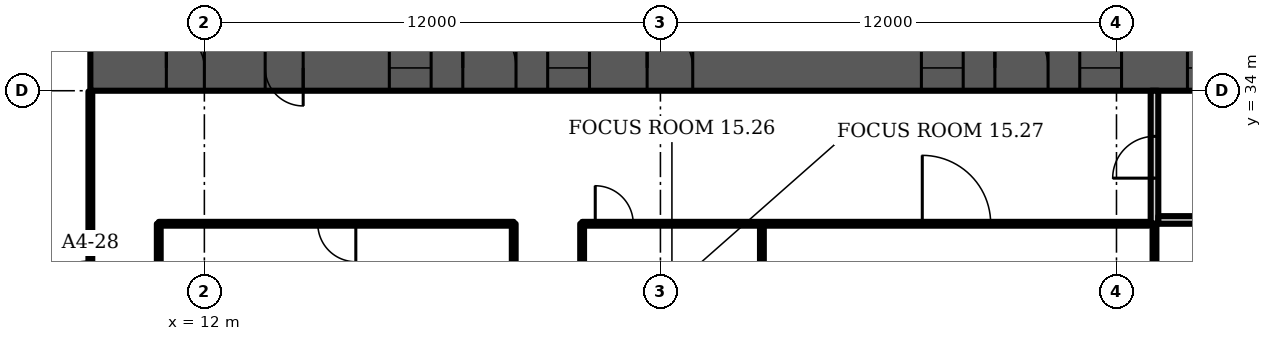
"""IFC4 building model, lengths in metres.
Left out: names, types, materials, properties, quantities, classifications, styles, units other than length and angle.
Written with IfcOpenShell. Run it as: python <this file> out.ifc"""

import sys

from ifc_helpers import new_model, si_unit, direction, frame, frame_2d, origin, place, context, subcontext, project, spatial, rectangle, extrude, element, fill, save


model = new_model("IFC4")
c1 = context("Model", 3, precision=1e-05, world=origin(), true_north=direction((0.0, 1.0)))
c2 = subcontext(c1, "Body", "Model", "MODEL_VIEW")
j1 = project(units=[si_unit("LENGTHUNIT", "METRE"), si_unit("PLANEANGLEUNIT", "RADIAN")], contexts=[c1])
p1 = place(None, origin())
s1 = spatial("IfcSite", under=j1, at=p1, CompositionType="ELEMENT")
p2 = place(p1, origin())
s2 = spatial("IfcBuilding", under=s1, at=p2, CompositionType="ELEMENT")
p3 = place(p2, frame((0.0, 0.0, 73.9)))
s3 = spatial("IfcBuildingStorey", under=s2, at=p3, CompositionType="ELEMENT", Elevation=73.9)
p4 = place(p3, frame((9.0, 34.6, 0.0), z_axis=(0.0, 0.0, 1.0), x_axis=(1.0, 0.0, 0.0)))
e1 = element("IfcWall", 1, at=p4, inside=s3, PredefinedType="SHEAR", context=c2, shape_type="SweptSolid", body=[
    extrude(rectangle(XDim=56.0, YDim=1.2, at=frame_2d((28.0, 0.0))), origin(), (0.0, 0.0, 1.0), 3.6),
])
p5 = place(p4, frame((2.0, 0.0, 0.0)))
e2 = element("IfcOpeningElement", 2, at=p5, cuts=e1, PredefinedType="OPENING", context=c2, shape_type="SweptSolid", body=[
    extrude(rectangle(XDim=1.0, YDim=2.1, at=frame_2d((0.5, 1.05))), frame((0.0, 0.61, 0.0), z_axis=(0.0, -1.0, 0.0), x_axis=(1.0, 0.0, 0.0)), (0.0, 0.0, 1.0), 1.22),
])
p6 = place(p4, frame((4.6, 0.0, 0.0)))
e3 = element("IfcOpeningElement", 3, at=p6, cuts=e1, PredefinedType="OPENING", context=c2, shape_type="SweptSolid", body=[
    extrude(rectangle(XDim=1.0, YDim=2.1, at=frame_2d((0.5, 1.05))), frame((0.0, 0.61, 0.0), z_axis=(0.0, -1.0, 0.0), x_axis=(1.0, 0.0, 0.0)), (0.0, 0.0, 1.0), 1.22),
])
p7 = place(p4, frame((7.867, 0.0, 0.0)))
e4 = element("IfcOpeningElement", 4, at=p7, cuts=e1, PredefinedType="OPENING", context=c2, shape_type="SweptSolid", body=[
    extrude(rectangle(XDim=1.1, YDim=2.1, at=frame_2d((0.55, 1.05))), frame((0.0, 0.61, 0.0), z_axis=(0.0, -1.0, 0.0), x_axis=(1.0, 0.0, 0.0)), (0.0, 0.0, 1.0), 1.22),
])
p8 = place(p4, frame((12.033, 0.0, 0.0)))
e5 = element("IfcOpeningElement", 5, at=p8, cuts=e1, PredefinedType="OPENING", context=c2, shape_type="SweptSolid", body=[
    extrude(rectangle(XDim=1.1, YDim=2.1, at=frame_2d((0.55, 1.05))), frame((0.0, 0.61, 0.0), z_axis=(0.0, -1.0, 0.0), x_axis=(1.0, 0.0, 0.0)), (0.0, 0.0, 1.0), 1.22),
])
p9 = place(p4, frame((9.8, 0.0, 0.0)))
e6 = element("IfcOpeningElement", 6, at=p9, cuts=e1, PredefinedType="OPENING", context=c2, shape_type="SweptSolid", body=[
    extrude(rectangle(XDim=1.4, YDim=2.1, at=frame_2d((0.7, 1.05))), frame((0.0, 0.61, 0.0), z_axis=(0.0, -1.0, 0.0), x_axis=(1.0, 0.0, 0.0)), (0.0, 0.0, 1.0), 1.22),
])
p10 = place(p4, frame((14.65, 0.0, 0.0)))
e7 = element("IfcOpeningElement", 7, at=p10, cuts=e1, PredefinedType="OPENING", context=c2, shape_type="SweptSolid", body=[
    extrude(rectangle(XDim=1.2, YDim=2.1, at=frame_2d((0.6, 1.05))), frame((0.0, 0.61, 0.0), z_axis=(0.0, -1.0, 0.0), x_axis=(1.0, 0.0, 0.0)), (0.0, 0.0, 1.0), 1.22),
])
p11 = place(p4, frame((21.867, 0.0, 0.0)))
e8 = element("IfcOpeningElement", 8, at=p11, cuts=e1, PredefinedType="OPENING", context=c2, shape_type="SweptSolid", body=[
    extrude(rectangle(XDim=1.1, YDim=2.1, at=frame_2d((0.55, 1.05))), frame((0.0, 0.61, 0.0), z_axis=(0.0, -1.0, 0.0), x_axis=(1.0, 0.0, 0.0)), (0.0, 0.0, 1.0), 1.22),
])
p12 = place(p4, frame((26.033, 0.0, 0.0)))
e9 = element("IfcOpeningElement", 9, at=p12, cuts=e1, PredefinedType="OPENING", context=c2, shape_type="SweptSolid", body=[
    extrude(rectangle(XDim=1.1, YDim=2.1, at=frame_2d((0.55, 1.05))), frame((0.0, 0.61, 0.0), z_axis=(0.0, -1.0, 0.0), x_axis=(1.0, 0.0, 0.0)), (0.0, 0.0, 1.0), 1.22),
])
p13 = place(p4, frame((23.8, 0.0, 0.0)))
e10 = element("IfcOpeningElement", 10, at=p13, cuts=e1, PredefinedType="OPENING", context=c2, shape_type="SweptSolid", body=[
    extrude(rectangle(XDim=1.4, YDim=2.1, at=frame_2d((0.7, 1.05))), frame((0.0, 0.61, 0.0), z_axis=(0.0, -1.0, 0.0), x_axis=(1.0, 0.0, 0.0)), (0.0, 0.0, 1.0), 1.22),
])
p14 = place(p4, frame((28.867, 0.0, 0.0)))
e11 = element("IfcOpeningElement", 11, at=p14, cuts=e1, PredefinedType="OPENING", context=c2, shape_type="SweptSolid", body=[
    extrude(rectangle(XDim=1.1, YDim=2.1, at=frame_2d((0.55, 1.05))), frame((0.0, 0.61, 0.0), z_axis=(0.0, -1.0, 0.0), x_axis=(1.0, 0.0, 0.0)), (0.0, 0.0, 1.0), 1.22),
])
p15 = place(p4, frame((33.033, 0.0, 0.0)))
e12 = element("IfcOpeningElement", 12, at=p15, cuts=e1, PredefinedType="OPENING", context=c2, shape_type="SweptSolid", body=[
    extrude(rectangle(XDim=1.1, YDim=2.1, at=frame_2d((0.55, 1.05))), frame((0.0, 0.61, 0.0), z_axis=(0.0, -1.0, 0.0), x_axis=(1.0, 0.0, 0.0)), (0.0, 0.0, 1.0), 1.22),
])
p16 = place(p4, frame((40.15, 0.0, 0.0)))
e13 = element("IfcOpeningElement", 13, at=p16, cuts=e1, PredefinedType="OPENING", context=c2, shape_type="SweptSolid", body=[
    extrude(rectangle(XDim=1.2, YDim=2.1, at=frame_2d((0.6, 1.05))), frame((0.0, 0.61, 0.0), z_axis=(0.0, -1.0, 0.0), x_axis=(1.0, 0.0, 0.0)), (0.0, 0.0, 1.0), 1.22),
])
p17 = place(p4, frame((44.8, 0.0, 0.0)))
e14 = element("IfcOpeningElement", 14, at=p17, cuts=e1, PredefinedType="OPENING", context=c2, shape_type="SweptSolid", body=[
    extrude(rectangle(XDim=1.4, YDim=2.1, at=frame_2d((0.7, 1.05))), frame((0.0, 0.61, 0.0), z_axis=(0.0, -1.0, 0.0), x_axis=(1.0, 0.0, 0.0)), (0.0, 0.0, 1.0), 1.22),
])
p18 = place(p4, frame((49.867, 0.0, 0.0)))
e15 = element("IfcOpeningElement", 15, at=p18, cuts=e1, PredefinedType="OPENING", context=c2, shape_type="SweptSolid", body=[
    extrude(rectangle(XDim=1.1, YDim=2.1, at=frame_2d((0.55, 1.05))), frame((0.0, 0.61, 0.0), z_axis=(0.0, -1.0, 0.0), x_axis=(1.0, 0.0, 0.0)), (0.0, 0.0, 1.0), 1.22),
])
p19 = place(p4, frame((53.5, 0.0, 0.0)))
e16 = element("IfcOpeningElement", 16, at=p19, cuts=e1, PredefinedType="OPENING", context=c2, shape_type="SweptSolid", body=[
    extrude(rectangle(XDim=1.1, YDim=2.1, at=frame_2d((0.55, 1.05))), frame((0.0, 0.61, 0.0), z_axis=(0.0, -1.0, 0.0), x_axis=(1.0, 0.0, 0.0)), (0.0, 0.0, 1.0), 1.22),
])
p20 = place(p4, frame((51.567, 0.0, 0.0)))
e17 = element("IfcOpeningElement", 17, at=p20, cuts=e1, PredefinedType="OPENING", context=c2, shape_type="SweptSolid", body=[
    extrude(rectangle(XDim=1.4, YDim=2.1, at=frame_2d((0.7, 1.05))), frame((0.0, 0.61, 0.0), z_axis=(0.0, -1.0, 0.0), x_axis=(1.0, 0.0, 0.0)), (0.0, 0.0, 1.0), 1.22),
])
p21 = place(p3, frame((37.0, 30.5, 0.0), z_axis=(0.0, 0.0, 1.0), x_axis=(0.0, 1.0, 0.0)))
e18 = element("IfcWall", 18, at=p21, inside=s3, PredefinedType="PARTITIONING", context=c2, shape_type="SweptSolid", body=[
    extrude(rectangle(XDim=3.5, YDim=0.2, at=frame_2d((1.75, 0.0))), origin(), (0.0, 0.0, 1.0), 3.2),
])
p22 = place(p21, frame((1.2, 0.0, 0.0)))
e19 = element("IfcOpeningElement", 19, at=p22, cuts=e18, PredefinedType="OPENING", context=c2, shape_type="SweptSolid", body=[
    extrude(rectangle(XDim=1.1, YDim=2.1, at=frame_2d((0.55, 1.05))), frame((0.0, 0.11, 0.0), z_axis=(0.0, -1.0, 0.0), x_axis=(1.0, 0.0, 0.0)), (0.0, 0.0, 1.0), 0.22),
])
p23 = place(p3, frame((37.1, 30.6, 0.0), z_axis=(0.0, 0.0, 1.0), x_axis=(1.0, 0.0, 0.0)))
e20 = element("IfcWall", 20, at=p23, inside=s3, PredefinedType="PARTITIONING", context=c2, shape_type="SweptSolid", body=[
    extrude(rectangle(XDim=2.8, YDim=0.2, at=frame_2d((1.4, 0.0))), origin(), (0.0, 0.0, 1.0), 3.2),
])
p24 = place(p3, frame((9.0, 26.02, 0.0), z_axis=(0.0, 0.0, 1.0), x_axis=(0.0, 1.0, 0.0)))
e21 = element("IfcWall", 21, at=p24, inside=s3, PredefinedType="PARTITIONING", context=c2, shape_type="SweptSolid", body=[
    extrude(rectangle(XDim=7.96, YDim=0.1, at=frame_2d((3.98, 0.0))), origin(), (0.0, 0.0, 1.0), 3.2),
])
p25 = place(p24, frame((1.7, 0.0, 0.0)))
e22 = element("IfcOpeningElement", 22, at=p25, cuts=e21, PredefinedType="OPENING", context=c2, shape_type="SweptSolid", body=[
    extrude(rectangle(XDim=1.8, YDim=2.1, at=frame_2d((0.9, 1.05))), frame((0.0, 0.06, 0.0), z_axis=(0.0, -1.0, 0.0), x_axis=(1.0, 0.0, 0.0)), (0.0, 0.0, 1.0), 0.12),
])
p26 = place(p3, frame((10.8, 21.6, 0.0), z_axis=(0.0, 0.0, 1.0), x_axis=(0.0, 1.0, 0.0)))
e23 = element("IfcWall", 23, at=p26, inside=s3, PredefinedType="PARTITIONING", context=c2, shape_type="SweptSolid", body=[
    extrude(rectangle(XDim=8.9, YDim=0.1, at=frame_2d((4.45, 0.0))), origin(), (0.0, 0.0, 1.0), 3.2),
])
p27 = place(p3, frame((10.8, 30.5, 0.0), z_axis=(0.0, 0.0, 1.0), x_axis=(1.0, 0.0, 0.0)))
e24 = element("IfcWall", 24, at=p27, inside=s3, PredefinedType="PARTITIONING", context=c2, shape_type="SweptSolid", body=[
    extrude(rectangle(XDim=9.34, YDim=0.1, at=frame_2d((4.67, 0.0))), origin(), (0.0, 0.0, 1.0), 3.2),
])
p28 = place(p27, frame((4.185, 0.0, 0.0)))
e25 = element("IfcOpeningElement", 25, at=p28, cuts=e24, PredefinedType="OPENING", context=c2, shape_type="SweptSolid", body=[
    extrude(rectangle(XDim=1.0, YDim=2.1, at=frame_2d((0.5, 1.05))), frame((0.0, 0.06, 0.0), z_axis=(0.0, -1.0, 0.0), x_axis=(1.0, 0.0, 0.0)), (0.0, 0.0, 1.0), 0.12),
])
p29 = place(p3, frame((20.14, -1.13, 0.0), z_axis=(0.0, 0.0, 1.0), x_axis=(0.0, 1.0, 0.0)))
e26 = element("IfcWall", 26, at=p29, inside=s3, PredefinedType="PARTITIONING", context=c2, shape_type="SweptSolid", body=[
    extrude(rectangle(XDim=31.63, YDim=0.1, at=frame_2d((15.815, 0.0))), origin(), (0.0, 0.0, 1.0), 3.2),
])
p30 = place(p29, frame((1.825, 0.0, 0.0)))
e27 = element("IfcOpeningElement", 27, at=p30, cuts=e26, PredefinedType="OPENING", context=c2, shape_type="SweptSolid", body=[
    extrude(rectangle(XDim=1.0, YDim=2.1, at=frame_2d((0.5, 1.05))), frame((0.0, 0.06, 0.0), z_axis=(0.0, -1.0, 0.0), x_axis=(1.0, 0.0, 0.0)), (0.0, 0.0, 1.0), 0.12),
])
p31 = place(p29, frame((6.305, 0.0, 0.0)))
e28 = element("IfcOpeningElement", 28, at=p31, cuts=e26, PredefinedType="OPENING", context=c2, shape_type="SweptSolid", body=[
    extrude(rectangle(XDim=1.0, YDim=2.1, at=frame_2d((0.5, 1.05))), frame((0.0, 0.06, 0.0), z_axis=(0.0, -1.0, 0.0), x_axis=(1.0, 0.0, 0.0)), (0.0, 0.0, 1.0), 0.12),
])
p32 = place(p29, frame((11.35, 0.0, 0.0)))
e29 = element("IfcOpeningElement", 29, at=p32, cuts=e26, PredefinedType="OPENING", context=c2, shape_type="SweptSolid", body=[
    extrude(rectangle(XDim=1.0, YDim=2.1, at=frame_2d((0.5, 1.05))), frame((0.0, 0.06, 0.0), z_axis=(0.0, -1.0, 0.0), x_axis=(1.0, 0.0, 0.0)), (0.0, 0.0, 1.0), 0.12),
])
p33 = place(p29, frame((15.985, 0.0, 0.0)))
e30 = element("IfcOpeningElement", 30, at=p33, cuts=e26, PredefinedType="OPENING", context=c2, shape_type="SweptSolid", body=[
    extrude(rectangle(XDim=1.0, YDim=2.1, at=frame_2d((0.5, 1.05))), frame((0.0, 0.06, 0.0), z_axis=(0.0, -1.0, 0.0), x_axis=(1.0, 0.0, 0.0)), (0.0, 0.0, 1.0), 0.12),
])
p34 = place(p29, frame((20.38, 0.0, 0.0)))
e31 = element("IfcOpeningElement", 31, at=p34, cuts=e26, PredefinedType="OPENING", context=c2, shape_type="SweptSolid", body=[
    extrude(rectangle(XDim=1.0, YDim=2.1, at=frame_2d((0.5, 1.05))), frame((0.0, 0.06, 0.0), z_axis=(0.0, -1.0, 0.0), x_axis=(1.0, 0.0, 0.0)), (0.0, 0.0, 1.0), 0.12),
])
p35 = place(p29, frame((24.695, 0.0, 0.0)))
e32 = element("IfcOpeningElement", 32, at=p35, cuts=e26, PredefinedType="OPENING", context=c2, shape_type="SweptSolid", body=[
    extrude(rectangle(XDim=1.0, YDim=2.1, at=frame_2d((0.5, 1.05))), frame((0.0, 0.06, 0.0), z_axis=(0.0, -1.0, 0.0), x_axis=(1.0, 0.0, 0.0)), (0.0, 0.0, 1.0), 0.12),
])
p36 = place(p3, frame((21.94, -1.29, 0.0), z_axis=(0.0, 0.0, 1.0), x_axis=(0.0, 1.0, 0.0)))
e33 = element("IfcWall", 33, at=p36, inside=s3, PredefinedType="PARTITIONING", context=c2, shape_type="SweptSolid", body=[
    extrude(rectangle(XDim=31.79, YDim=0.1, at=frame_2d((15.895, 0.0))), origin(), (0.0, 0.0, 1.0), 3.2),
])
p37 = place(p36, frame((1.82, 0.0, 0.0)))
e34 = element("IfcOpeningElement", 34, at=p37, cuts=e33, PredefinedType="OPENING", context=c2, shape_type="SweptSolid", body=[
    extrude(rectangle(XDim=1.0, YDim=2.1, at=frame_2d((0.5, 1.05))), frame((0.0, 0.06, 0.0), z_axis=(0.0, -1.0, 0.0), x_axis=(1.0, 0.0, 0.0)), (0.0, 0.0, 1.0), 0.12),
])
p38 = place(p36, frame((6.63, 0.0, 0.0)))
e35 = element("IfcOpeningElement", 35, at=p38, cuts=e33, PredefinedType="OPENING", context=c2, shape_type="SweptSolid", body=[
    extrude(rectangle(XDim=1.0, YDim=2.1, at=frame_2d((0.5, 1.05))), frame((0.0, 0.06, 0.0), z_axis=(0.0, -1.0, 0.0), x_axis=(1.0, 0.0, 0.0)), (0.0, 0.0, 1.0), 0.12),
])
p39 = place(p36, frame((11.59, 0.0, 0.0)))
e36 = element("IfcOpeningElement", 36, at=p39, cuts=e33, PredefinedType="OPENING", context=c2, shape_type="SweptSolid", body=[
    extrude(rectangle(XDim=1.0, YDim=2.1, at=frame_2d((0.5, 1.05))), frame((0.0, 0.06, 0.0), z_axis=(0.0, -1.0, 0.0), x_axis=(1.0, 0.0, 0.0)), (0.0, 0.0, 1.0), 0.12),
])
p40 = place(p36, frame((15.55, 0.0, 0.0)))
e37 = element("IfcOpeningElement", 37, at=p40, cuts=e33, PredefinedType="OPENING", context=c2, shape_type="SweptSolid", body=[
    extrude(rectangle(XDim=1.0, YDim=2.1, at=frame_2d((0.5, 1.05))), frame((0.0, 0.06, 0.0), z_axis=(0.0, -1.0, 0.0), x_axis=(1.0, 0.0, 0.0)), (0.0, 0.0, 1.0), 0.12),
])
p41 = place(p36, frame((18.425, 0.0, 0.0)))
e38 = element("IfcOpeningElement", 38, at=p41, cuts=e33, PredefinedType="OPENING", context=c2, shape_type="SweptSolid", body=[
    extrude(rectangle(XDim=1.0, YDim=2.1, at=frame_2d((0.5, 1.05))), frame((0.0, 0.06, 0.0), z_axis=(0.0, -1.0, 0.0), x_axis=(1.0, 0.0, 0.0)), (0.0, 0.0, 1.0), 0.12),
])
p42 = place(p36, frame((21.305, 0.0, 0.0)))
e39 = element("IfcOpeningElement", 39, at=p42, cuts=e33, PredefinedType="OPENING", context=c2, shape_type="SweptSolid", body=[
    extrude(rectangle(XDim=1.0, YDim=2.1, at=frame_2d((0.5, 1.05))), frame((0.0, 0.06, 0.0), z_axis=(0.0, -1.0, 0.0), x_axis=(1.0, 0.0, 0.0)), (0.0, 0.0, 1.0), 0.12),
])
p43 = place(p36, frame((24.18, 0.0, 0.0)))
e40 = element("IfcOpeningElement", 40, at=p43, cuts=e33, PredefinedType="OPENING", context=c2, shape_type="SweptSolid", body=[
    extrude(rectangle(XDim=1.0, YDim=2.1, at=frame_2d((0.5, 1.05))), frame((0.0, 0.06, 0.0), z_axis=(0.0, -1.0, 0.0), x_axis=(1.0, 0.0, 0.0)), (0.0, 0.0, 1.0), 0.12),
])
p44 = place(p36, frame((27.055, 0.0, 0.0)))
e41 = element("IfcOpeningElement", 41, at=p44, cuts=e33, PredefinedType="OPENING", context=c2, shape_type="SweptSolid", body=[
    extrude(rectangle(XDim=1.0, YDim=2.1, at=frame_2d((0.5, 1.05))), frame((0.0, 0.06, 0.0), z_axis=(0.0, -1.0, 0.0), x_axis=(1.0, 0.0, 0.0)), (0.0, 0.0, 1.0), 0.12),
])
p45 = place(p3, frame((21.94, 30.5, 0.0), z_axis=(0.0, 0.0, 1.0), x_axis=(1.0, 0.0, 0.0)))
e42 = element("IfcWall", 42, at=p45, inside=s3, PredefinedType="PARTITIONING", context=c2, shape_type="SweptSolid", body=[
    extrude(rectangle(XDim=14.91, YDim=0.1, at=frame_2d((7.455, 0.0))), origin(), (0.0, 0.0, 1.0), 3.2),
])
p46 = place(p45, frame((0.345, 0.0, 0.0)))
e43 = element("IfcOpeningElement", 43, at=p46, cuts=e42, PredefinedType="OPENING", context=c2, shape_type="SweptSolid", body=[
    extrude(rectangle(XDim=1.0, YDim=2.1, at=frame_2d((0.5, 1.05))), frame((0.0, 0.06, 0.0), z_axis=(0.0, -1.0, 0.0), x_axis=(1.0, 0.0, 0.0)), (0.0, 0.0, 1.0), 0.12),
])
p47 = place(p45, frame((8.95, 0.0, 0.0)))
e44 = element("IfcOpeningElement", 44, at=p47, cuts=e42, PredefinedType="OPENING", context=c2, shape_type="SweptSolid", body=[
    extrude(rectangle(XDim=1.8, YDim=2.1, at=frame_2d((0.9, 1.05))), frame((0.0, 0.06, 0.0), z_axis=(0.0, -1.0, 0.0), x_axis=(1.0, 0.0, 0.0)), (0.0, 0.0, 1.0), 0.12),
])
p48 = place(p3, frame((26.67, 16.115, 0.0), z_axis=(0.0, 0.0, 1.0), x_axis=(0.0, 1.0, 0.0)))
e45 = element("IfcWall", 45, at=p48, inside=s3, PredefinedType="PARTITIONING", context=c2, shape_type="SweptSolid", body=[
    extrude(rectangle(XDim=14.385, YDim=0.1, at=frame_2d((7.192, 0.0))), origin(), (0.0, 0.0, 1.0), 3.2),
])
p49 = place(p3, frame((37.0, 13.24, 0.0), z_axis=(0.0, 0.0, 1.0), x_axis=(0.0, 1.0, 0.0)))
e46 = element("IfcWall", 46, at=p49, inside=s3, PredefinedType="PARTITIONING", context=c2, shape_type="SweptSolid", body=[
    extrude(rectangle(XDim=17.26, YDim=0.1, at=frame_2d((8.63, 0.0))), origin(), (0.0, 0.0, 1.0), 3.2),
])
p50 = place(p5, origin())
e47 = element("IfcDoor", 47, at=p50, inside=s3, OperationType="SINGLE_SWING_LEFT", PredefinedType="DOOR", context=c2, shape_type="SweptSolid", body=[
    extrude(rectangle(XDim=1.0, YDim=2.1, at=frame_2d((0.5, 1.05))), frame((0.0, 0.6, 0.0), z_axis=(0.0, -1.0, 0.0), x_axis=(1.0, 0.0, 0.0)), (0.0, 0.0, 1.0), 1.199),
])
fill(e2, e47)
p51 = place(p6, origin())
e48 = element("IfcDoor", 48, at=p51, inside=s3, OperationType="SINGLE_SWING_RIGHT", PredefinedType="DOOR", context=c2, shape_type="SweptSolid", body=[
    extrude(rectangle(XDim=1.0, YDim=2.1, at=frame_2d((0.5, 1.05))), frame((0.0, 0.6, 0.0), z_axis=(0.0, -1.0, 0.0), x_axis=(1.0, 0.0, 0.0)), (0.0, 0.0, 1.0), 1.199),
])
fill(e3, e48)
p52 = place(p7, origin())
e49 = element("IfcDoor", 49, at=p52, inside=s3, OperationType="DOUBLE_DOOR_SLIDING", PredefinedType="DOOR", context=c2, shape_type="SweptSolid", body=[
    extrude(rectangle(XDim=1.1, YDim=2.1, at=frame_2d((0.55, 1.05))), frame((0.0, 0.025, 0.0), z_axis=(0.0, -1.0, 0.0), x_axis=(1.0, 0.0, 0.0)), (0.0, 0.0, 1.0), 0.05),
])
fill(e4, e49)
p53 = place(p8, origin())
e50 = element("IfcDoor", 50, at=p53, inside=s3, OperationType="DOUBLE_DOOR_SLIDING", PredefinedType="DOOR", context=c2, shape_type="SweptSolid", body=[
    extrude(rectangle(XDim=1.1, YDim=2.1, at=frame_2d((0.55, 1.05))), frame((0.0, 0.025, 0.0), z_axis=(0.0, -1.0, 0.0), x_axis=(1.0, 0.0, 0.0)), (0.0, 0.0, 1.0), 0.05),
])
fill(e5, e50)
p54 = place(p9, origin())
e51 = element("IfcDoor", 51, at=p54, inside=s3, OperationType="DOUBLE_DOOR_SINGLE_SWING", PredefinedType="DOOR", context=c2, shape_type="SweptSolid", body=[
    extrude(rectangle(XDim=1.4, YDim=2.1, at=frame_2d((0.7, 1.05))), frame((0.0, 0.025, 0.0), z_axis=(0.0, -1.0, 0.0), x_axis=(1.0, 0.0, 0.0)), (0.0, 0.0, 1.0), 0.05),
])
fill(e6, e51)
p55 = place(p10, origin())
e52 = element("IfcDoor", 52, at=p55, inside=s3, OperationType="SINGLE_SWING_LEFT", PredefinedType="DOOR", context=c2, shape_type="SweptSolid", body=[
    extrude(rectangle(XDim=1.2, YDim=2.1, at=frame_2d((0.6, 1.05))), frame((0.0, 0.025, 0.0), z_axis=(0.0, -1.0, 0.0), x_axis=(1.0, 0.0, 0.0)), (0.0, 0.0, 1.0), 0.05),
])
fill(e7, e52)
p56 = place(p11, origin())
e53 = element("IfcDoor", 53, at=p56, inside=s3, OperationType="DOUBLE_DOOR_SLIDING", PredefinedType="DOOR", context=c2, shape_type="SweptSolid", body=[
    extrude(rectangle(XDim=1.1, YDim=2.1, at=frame_2d((0.55, 1.05))), frame((0.0, 0.025, 0.0), z_axis=(0.0, -1.0, 0.0), x_axis=(1.0, 0.0, 0.0)), (0.0, 0.0, 1.0), 0.05),
])
fill(e8, e53)
p57 = place(p12, origin())
e54 = element("IfcDoor", 54, at=p57, inside=s3, OperationType="DOUBLE_DOOR_SLIDING", PredefinedType="DOOR", context=c2, shape_type="SweptSolid", body=[
    extrude(rectangle(XDim=1.1, YDim=2.1, at=frame_2d((0.55, 1.05))), frame((0.0, 0.025, 0.0), z_axis=(0.0, -1.0, 0.0), x_axis=(1.0, 0.0, 0.0)), (0.0, 0.0, 1.0), 0.05),
])
fill(e9, e54)
p58 = place(p13, origin())
e55 = element("IfcDoor", 55, at=p58, inside=s3, OperationType="DOUBLE_DOOR_SINGLE_SWING", PredefinedType="DOOR", context=c2, shape_type="SweptSolid", body=[
    extrude(rectangle(XDim=1.4, YDim=2.1, at=frame_2d((0.7, 1.05))), frame((0.0, 0.025, 0.0), z_axis=(0.0, -1.0, 0.0), x_axis=(1.0, 0.0, 0.0)), (0.0, 0.0, 1.0), 0.05),
])
fill(e10, e55)
p59 = place(p14, origin())
e56 = element("IfcDoor", 56, at=p59, inside=s3, OperationType="DOUBLE_DOOR_SLIDING", PredefinedType="DOOR", context=c2, shape_type="SweptSolid", body=[
    extrude(rectangle(XDim=1.1, YDim=2.1, at=frame_2d((0.55, 1.05))), frame((0.0, 0.025, 0.0), z_axis=(0.0, -1.0, 0.0), x_axis=(1.0, 0.0, 0.0)), (0.0, 0.0, 1.0), 0.05),
])
fill(e11, e56)
p60 = place(p22, origin())
e57 = element("IfcDoor", 57, at=p60, inside=s3, OperationType="SINGLE_SWING_LEFT", PredefinedType="DOOR", context=c2, shape_type="SweptSolid", body=[
    extrude(rectangle(XDim=1.1, YDim=2.1, at=frame_2d((0.55, 1.05))), frame((0.0, 0.025, 0.0), z_axis=(0.0, -1.0, 0.0), x_axis=(1.0, 0.0, 0.0)), (0.0, 0.0, 1.0), 0.05),
])
fill(e19, e57)
p61 = place(p25, origin())
e58 = element("IfcDoor", 58, at=p61, inside=s3, OperationType="DOUBLE_DOOR_SINGLE_SWING", PredefinedType="DOOR", context=c2, shape_type="SweptSolid", body=[
    extrude(rectangle(XDim=1.8, YDim=2.1, at=frame_2d((0.9, 1.05))), frame((0.0, 0.025, 0.0), z_axis=(0.0, -1.0, 0.0), x_axis=(1.0, 0.0, 0.0)), (0.0, 0.0, 1.0), 0.05),
])
fill(e22, e58)
p62 = place(p28, origin())
e59 = element("IfcDoor", 59, at=p62, inside=s3, OperationType="SINGLE_SWING_RIGHT", PredefinedType="DOOR", context=c2, shape_type="SweptSolid", body=[
    extrude(rectangle(XDim=1.0, YDim=2.1, at=frame_2d((0.5, 1.05))), frame((0.0, 0.025, 0.0), z_axis=(0.0, -1.0, 0.0), x_axis=(1.0, 0.0, 0.0)), (0.0, 0.0, 1.0), 0.05),
])
fill(e25, e59)
p63 = place(p46, origin())
e60 = element("IfcDoor", 60, at=p63, inside=s3, OperationType="SINGLE_SWING_LEFT", PredefinedType="DOOR", context=c2, shape_type="SweptSolid", body=[
    extrude(rectangle(XDim=1.0, YDim=2.1, at=frame_2d((0.5, 1.05))), frame((0.0, 0.025, 0.0), z_axis=(0.0, -1.0, 0.0), x_axis=(1.0, 0.0, 0.0)), (0.0, 0.0, 1.0), 0.05),
])
fill(e43, e60)
p64 = place(p47, origin())
e61 = element("IfcDoor", 61, at=p64, inside=s3, OperationType="DOUBLE_DOOR_SINGLE_SWING", PredefinedType="DOOR", context=c2, shape_type="SweptSolid", body=[
    extrude(rectangle(XDim=1.8, YDim=2.1, at=frame_2d((0.9, 1.05))), frame((0.0, 0.025, 0.0), z_axis=(0.0, -1.0, 0.0), x_axis=(1.0, 0.0, 0.0)), (0.0, 0.0, 1.0), 0.05),
])
fill(e44, e61)
save(model, sys.argv[1])
